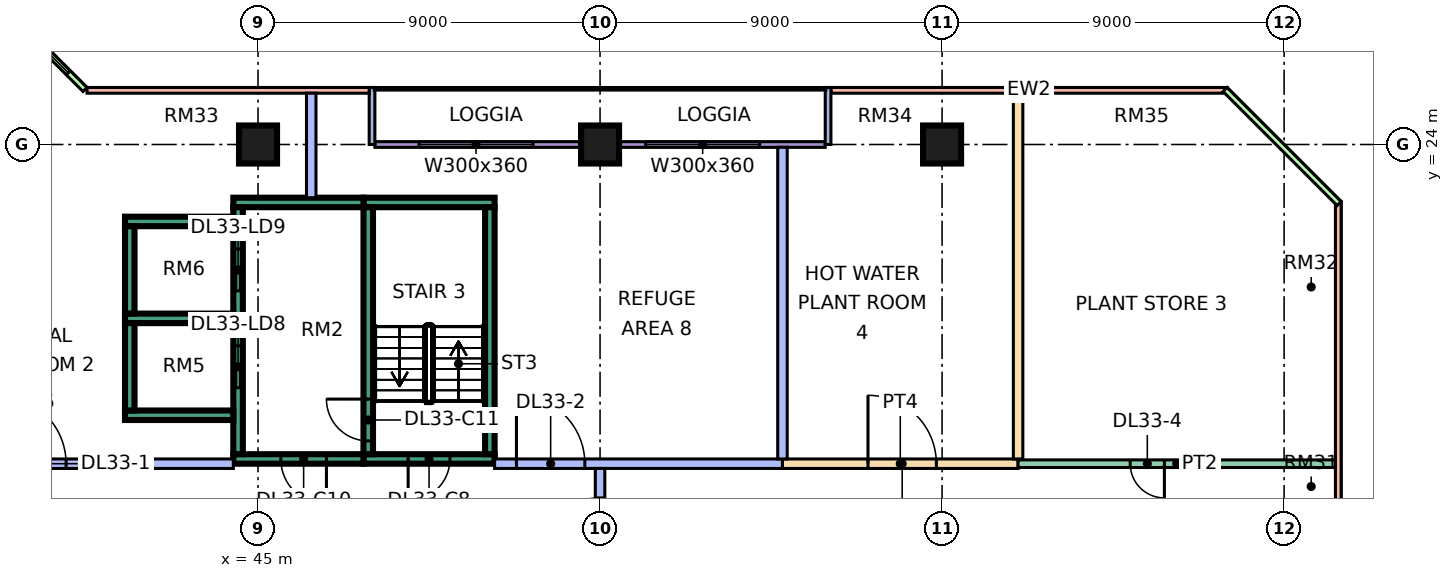
"""IFC4 building model, lengths in metres.
Left out: names, types, materials, properties, quantities, classifications, styles, units other than length and angle.
Written with IfcOpenShell. Run it as: python <this file> out.ifc"""

import sys

from ifc_helpers import new_model, si_unit, direction, frame, frame_2d, origin, origin_2d, place, context, subcontext, project, spatial, rectangle, extrude, element, fill, save


model = new_model("IFC4")
c1 = context("Model", 3, precision=1e-05, world=origin(), true_north=direction((0.0, 1.0)))
c2 = subcontext(c1, "Body", "Model", "MODEL_VIEW")
j1 = project(units=[si_unit("LENGTHUNIT", "METRE"), si_unit("PLANEANGLEUNIT", "RADIAN")], contexts=[c1])
p1 = place(None, origin())
s1 = spatial("IfcSite", under=j1, at=p1, CompositionType="ELEMENT")
p2 = place(p1, origin())
s2 = spatial("IfcBuilding", under=s1, at=p2, CompositionType="ELEMENT")
p3 = place(p2, frame((0.0, 0.0, 140.65)))
s3 = spatial("IfcBuildingStorey", under=s2, at=p3, CompositionType="ELEMENT", Elevation=140.65)
for number, where, z_axis, x_axis in (
    (1, (45.0, 24.0, 0.0), (0.0, 0.0, 1.0), (1.0, 0.0, 0.0)),
    (2, (54.0, 24.0, 0.0), (0.0, 0.0, 1.0), (1.0, 0.0, 0.0)),
    (3, (63.0, 24.0, 0.0), (0.0, 0.0, 1.0), (1.0, 0.0, 0.0)),
):
    element("IfcColumn", number, at=place(p3, frame(where, z_axis=z_axis, x_axis=x_axis)), inside=s3, PredefinedType="COLUMN", context=c2, shape_type="SweptSolid", body=[
        extrude(rectangle(XDim=1.0, YDim=1.0, at=origin_2d()), origin(), (0.0, 0.0, 1.0), 5.5),
    ])
p4 = place(p3, frame((47.775, 15.725, 0.0), z_axis=(0.0, 0.0, 1.0), x_axis=(1.0, 0.0, 0.0)))
e4 = element("IfcWall", 4, at=p4, inside=s3, PredefinedType="SHEAR", context=c2, shape_type="SweptSolid", body=[
    extrude(rectangle(XDim=3.45, YDim=0.25, at=frame_2d((1.725, 0.0))), origin(), (0.0, 0.0, 1.0), 5.5),
])
p5 = place(p4, frame((1.175, 0.0, 0.0)))
e5 = element("IfcOpeningElement", 5, at=p5, cuts=e4, PredefinedType="OPENING", context=c2, shape_type="SweptSolid", body=[
    extrude(rectangle(XDim=1.1, YDim=2.2, at=frame_2d((0.55, 1.1))), frame((0.0, 0.135, 0.0), z_axis=(0.0, -1.0, 0.0), x_axis=(1.0, 0.0, 0.0)), (0.0, 0.0, 1.0), 0.27),
])
p6 = place(p3, frame((47.775, 22.475, 0.0), z_axis=(0.0, 0.0, 1.0), x_axis=(1.0, 0.0, 0.0)))
e6 = element("IfcWall", 6, at=p6, inside=s3, PredefinedType="SHEAR", context=c2, shape_type="SweptSolid", body=[
    extrude(rectangle(XDim=3.45, YDim=0.25, at=frame_2d((1.725, 0.0))), origin(), (0.0, 0.0, 1.0), 5.5),
])
p7 = place(p3, frame((47.9, 15.85, 0.0), z_axis=(0.0, 0.0, 1.0), x_axis=(0.0, 1.0, 0.0)))
e7 = element("IfcWall", 7, at=p7, inside=s3, PredefinedType="SHEAR", context=c2, shape_type="SweptSolid", body=[
    extrude(rectangle(XDim=6.5, YDim=0.25, at=frame_2d((3.25, 0.0))), origin(), (0.0, 0.0, 1.0), 5.5),
])
p8 = place(p7, frame((0.35, 0.0, 0.0)))
e8 = element("IfcOpeningElement", 8, at=p8, cuts=e7, PredefinedType="OPENING", context=c2, shape_type="SweptSolid", body=[
    extrude(rectangle(XDim=1.1, YDim=2.2, at=frame_2d((0.55, 1.1))), frame((0.0, 0.135, 0.0), z_axis=(0.0, -1.0, 0.0), x_axis=(1.0, 0.0, 0.0)), (0.0, 0.0, 1.0), 0.27),
])
p9 = place(p3, frame((51.1, 15.85, 0.0), z_axis=(0.0, 0.0, 1.0), x_axis=(0.0, 1.0, 0.0)))
e9 = element("IfcWall", 9, at=p9, inside=s3, PredefinedType="SHEAR", context=c2, shape_type="SweptSolid", body=[
    extrude(rectangle(XDim=6.5, YDim=0.25, at=frame_2d((3.25, 0.0))), origin(), (0.0, 0.0, 1.0), 5.5),
])
p10 = place(p3, frame((44.35, 15.725, 0.0), z_axis=(0.0, 0.0, 1.0), x_axis=(1.0, 0.0, 0.0)))
e10 = element("IfcWall", 10, at=p10, inside=s3, PredefinedType="SHEAR", context=c2, shape_type="SweptSolid", body=[
    extrude(rectangle(XDim=3.425, YDim=0.25, at=frame_2d((1.712, 0.0))), origin(), (0.0, 0.0, 1.0), 5.5),
])
p11 = place(p10, frame((1.25, 0.0, 0.0)))
e11 = element("IfcOpeningElement", 11, at=p11, cuts=e10, PredefinedType="OPENING", context=c2, shape_type="SweptSolid", body=[
    extrude(rectangle(XDim=1.2, YDim=2.2, at=frame_2d((0.6, 1.1))), frame((0.0, 0.135, 0.0), z_axis=(0.0, -1.0, 0.0), x_axis=(1.0, 0.0, 0.0)), (0.0, 0.0, 1.0), 0.27),
])
p12 = place(p3, frame((44.35, 22.475, 0.0), z_axis=(0.0, 0.0, 1.0), x_axis=(1.0, 0.0, 0.0)))
e12 = element("IfcWall", 12, at=p12, inside=s3, PredefinedType="SHEAR", context=c2, shape_type="SweptSolid", body=[
    extrude(rectangle(XDim=3.425, YDim=0.25, at=frame_2d((1.712, 0.0))), origin(), (0.0, 0.0, 1.0), 5.5),
])
p13 = place(p3, frame((44.475, 15.85, 0.0), z_axis=(0.0, 0.0, 1.0), x_axis=(0.0, 1.0, 0.0)))
e13 = element("IfcWall", 13, at=p13, inside=s3, PredefinedType="SHEAR", context=c2, shape_type="SweptSolid", body=[
    extrude(rectangle(XDim=6.5, YDim=0.25, at=frame_2d((3.25, 0.0))), origin(), (0.0, 0.0, 1.0), 5.5),
])
p14 = place(p13, frame((1.75, 0.0, 0.0)))
e14 = element("IfcOpeningElement", 14, at=p14, cuts=e13, PredefinedType="OPENING", context=c2, shape_type="SweptSolid", body=[
    extrude(rectangle(XDim=1.1, YDim=2.2, at=frame_2d((0.55, 1.1))), frame((0.0, 0.135, 0.0), z_axis=(0.0, -1.0, 0.0), x_axis=(1.0, 0.0, 0.0)), (0.0, 0.0, 1.0), 0.27),
])
p15 = place(p13, frame((4.3, 0.0, 0.0)))
e15 = element("IfcOpeningElement", 15, at=p15, cuts=e13, PredefinedType="OPENING", context=c2, shape_type="SweptSolid", body=[
    extrude(rectangle(XDim=1.1, YDim=2.2, at=frame_2d((0.55, 1.1))), frame((0.0, 0.135, 0.0), z_axis=(0.0, -1.0, 0.0), x_axis=(1.0, 0.0, 0.0)), (0.0, 0.0, 1.0), 0.27),
])
for number, where, z_axis, x_axis in (
    (16, (41.5, 16.875, 0.0), (0.0, 0.0, 1.0), (1.0, 0.0, 0.0)),
    (17, (41.5, 19.425, 0.0), (0.0, 0.0, 1.0), (1.0, 0.0, 0.0)),
    (18, (41.5, 21.975, 0.0), (0.0, 0.0, 1.0), (1.0, 0.0, 0.0)),
):
    element("IfcWall", number, at=place(p3, frame(where, z_axis=z_axis, x_axis=x_axis)), inside=s3, PredefinedType="SHEAR", context=c2, shape_type="SweptSolid", body=[
        extrude(rectangle(XDim=2.85, YDim=0.25, at=frame_2d((1.425, 0.0))), origin(), (0.0, 0.0, 1.0), 5.5),
    ])
for number, where, z_axis, x_axis in (
    (19, (41.625, 17.0, 0.0), (0.0, 0.0, 1.0), (0.0, 1.0, 0.0)),
    (20, (41.625, 19.55, 0.0), (0.0, 0.0, 1.0), (0.0, 1.0, 0.0)),
):
    element("IfcWall", number, at=place(p3, frame(where, z_axis=z_axis, x_axis=x_axis)), inside=s3, PredefinedType="SHEAR", context=c2, shape_type="SweptSolid", body=[
        extrude(rectangle(XDim=2.3, YDim=0.25, at=frame_2d((1.15, 0.0))), origin(), (0.0, 0.0, 1.0), 5.5),
    ])
p16 = place(p3, frame((70.5, 25.425, 0.0), z_axis=(0.0, 0.0, 1.0), x_axis=(-1.0, 0.0, 0.0)))
e21 = element("IfcWall", 21, at=p16, inside=s3, PredefinedType="SOLIDWALL", context=c2, shape_type="SweptSolid", body=[
    extrude(rectangle(XDim=10.425, YDim=0.15, at=frame_2d((5.212, 0.0))), origin(), (0.0, 0.0, 1.0), 5.05),
])
p17 = place(p3, frame((59.925, 24.0, 0.0), z_axis=(0.0, 0.0, 1.0), x_axis=(-1.0, 0.0, 0.0)))
e22 = element("IfcWall", 22, at=p17, inside=s3, PredefinedType="SOLIDWALL", context=c2, shape_type="SweptSolid", body=[
    extrude(rectangle(XDim=11.85, YDim=0.15, at=frame_2d((5.925, 0.0))), origin(), (0.0, 0.0, 1.0), 5.05),
])
p18 = place(p17, frame((1.725, 0.0, 0.45)))
e23 = element("IfcOpeningElement", 23, at=p18, cuts=e22, PredefinedType="OPENING", context=c2, shape_type="SweptSolid", body=[
    extrude(rectangle(XDim=3.0, YDim=3.6, at=frame_2d((1.5, 1.8))), frame((0.0, 0.085, 0.0), z_axis=(0.0, -1.0, 0.0), x_axis=(1.0, 0.0, 0.0)), (0.0, 0.0, 1.0), 0.17),
])
p19 = place(p17, frame((7.688, 0.0, 0.45)))
e24 = element("IfcOpeningElement", 24, at=p19, cuts=e22, PredefinedType="OPENING", context=c2, shape_type="SweptSolid", body=[
    extrude(rectangle(XDim=3.0, YDim=3.6, at=frame_2d((1.5, 1.8))), frame((0.0, 0.085, 0.0), z_axis=(0.0, -1.0, 0.0), x_axis=(1.0, 0.0, 0.0)), (0.0, 0.0, 1.0), 0.17),
])
for number, where, z_axis, x_axis in (
    (25, (60.0, 25.5, 0.0), (0.0, 0.0, 1.0), (0.0, -1.0, 0.0)),
    (26, (48.0, 25.5, 0.0), (0.0, 0.0, 1.0), (0.0, -1.0, 0.0)),
):
    element("IfcWall", number, at=place(p3, frame(where, z_axis=z_axis, x_axis=x_axis)), inside=s3, PredefinedType="SOLIDWALL", context=c2, shape_type="SweptSolid", body=[
        extrude(rectangle(XDim=1.5, YDim=0.15, at=frame_2d((0.75, 0.0))), origin(), (0.0, 0.0, 1.0), 5.05),
    ])
p20 = place(p3, frame((47.925, 25.425, 0.0), z_axis=(0.0, 0.0, 1.0), x_axis=(-1.0, 0.0, 0.0)))
e27 = element("IfcWall", 27, at=p20, inside=s3, PredefinedType="SOLIDWALL", context=c2, shape_type="SweptSolid", body=[
    extrude(rectangle(XDim=7.425, YDim=0.15, at=frame_2d((3.712, 0.0))), origin(), (0.0, 0.0, 1.0), 5.05),
])
p21 = place(p3, frame((40.447, 25.447, 0.0), z_axis=(0.0, 0.0, 1.0), x_axis=(-0.707106781187, 0.707106781187, 0.0)))
e28 = element("IfcWall", 28, at=p21, inside=s3, PredefinedType="SOLIDWALL", context=c2, shape_type="SweptSolid", body=[
    extrude(rectangle(XDim=4.243, YDim=0.15, at=frame_2d((2.121, 0.0))), origin(), (0.0, 0.0, 1.0), 5.05),
])
p22 = place(p21, frame((0.621, 0.0, 0.45)))
e29 = element("IfcOpeningElement", 29, at=p22, cuts=e28, PredefinedType="OPENING", context=c2, shape_type="SweptSolid", body=[
    extrude(rectangle(XDim=3.0, YDim=3.6, at=frame_2d((1.5, 1.8))), frame((0.0, 0.085, 0.0), z_axis=(0.0, -1.0, 0.0), x_axis=(1.0, 0.0, 0.0)), (0.0, 0.0, 1.0), 0.17),
])
p23 = place(p3, frame((73.425, 12.075, 0.0), z_axis=(0.0, 0.0, 1.0), x_axis=(0.0, 1.0, 0.0)))
e30 = element("IfcWall", 30, at=p23, inside=s3, PredefinedType="SOLIDWALL", context=c2, shape_type="SweptSolid", body=[
    extrude(rectangle(XDim=10.425, YDim=0.15, at=frame_2d((5.212, 0.0))), origin(), (0.0, 0.0, 1.0), 5.05),
])
p24 = place(p3, frame((73.447, 22.447, 0.0), z_axis=(0.0, 0.0, 1.0), x_axis=(-0.707106781187, 0.707106781187, 0.0)))
e31 = element("IfcWall", 31, at=p24, inside=s3, PredefinedType="SOLIDWALL", context=c2, shape_type="SweptSolid", body=[
    extrude(rectangle(XDim=4.243, YDim=0.15, at=frame_2d((2.121, 0.0))), origin(), (0.0, 0.0, 1.0), 5.05),
])
p25 = place(p3, frame((34.0, 15.6, 0.0), z_axis=(0.0, 0.0, 1.0), x_axis=(1.0, 0.0, 0.0)))
e32 = element("IfcWall", 32, at=p25, inside=s3, PredefinedType="PARTITIONING", context=c2, shape_type="SweptSolid", body=[
    extrude(rectangle(XDim=10.35, YDim=0.25, at=frame_2d((5.175, 0.0))), origin(), (0.0, 0.0, 1.0), 5.05),
])
p26 = place(p25, frame((4.15, 0.0, 0.0)))
e33 = element("IfcOpeningElement", 33, at=p26, cuts=e32, PredefinedType="OPENING", context=c2, shape_type="SweptSolid", body=[
    extrude(rectangle(XDim=1.8, YDim=2.1, at=frame_2d((0.9, 1.05))), frame((0.0, 0.135, 0.0), z_axis=(0.0, -1.0, 0.0), x_axis=(1.0, 0.0, 0.0)), (0.0, 0.0, 1.0), 0.27),
])
p27 = place(p3, frame((46.4, 22.6, 0.0), z_axis=(0.0, 0.0, 1.0), x_axis=(0.0, 1.0, 0.0)))
e34 = element("IfcWall", 34, at=p27, inside=s3, PredefinedType="PARTITIONING", context=c2, shape_type="SweptSolid", body=[
    extrude(rectangle(XDim=2.75, YDim=0.25, at=frame_2d((1.375, 0.0))), origin(), (0.0, 0.0, 1.0), 5.05),
])
p28 = place(p3, frame((51.225, 15.6, 0.0), z_axis=(0.0, 0.0, 1.0), x_axis=(1.0, 0.0, 0.0)))
e35 = element("IfcWall", 35, at=p28, inside=s3, PredefinedType="PARTITIONING", context=c2, shape_type="SweptSolid", body=[
    extrude(rectangle(XDim=7.575, YDim=0.25, at=frame_2d((3.788, 0.0))), origin(), (0.0, 0.0, 1.0), 5.05),
])
p29 = place(p28, frame((0.575, 0.0, 0.0)))
e36 = element("IfcOpeningElement", 36, at=p29, cuts=e35, PredefinedType="OPENING", context=c2, shape_type="SweptSolid", body=[
    extrude(rectangle(XDim=1.8, YDim=2.1, at=frame_2d((0.9, 1.05))), frame((0.0, 0.135, 0.0), z_axis=(0.0, -1.0, 0.0), x_axis=(1.0, 0.0, 0.0)), (0.0, 0.0, 1.0), 0.27),
])
p30 = place(p3, frame((54.0, 0.074, 0.0), z_axis=(0.0, 0.0, 1.0), x_axis=(0.0, 1.0, 0.0)))
e37 = element("IfcWall", 37, at=p30, inside=s3, PredefinedType="PARTITIONING", context=c2, shape_type="SweptSolid", body=[
    extrude(rectangle(XDim=15.401, YDim=0.25, at=frame_2d((7.701, 0.0))), origin(), (0.0, 0.0, 1.0), 5.05),
])
p31 = place(p30, frame((12.826, 0.0, 0.0)))
e38 = element("IfcOpeningElement", 38, at=p31, cuts=e37, PredefinedType="OPENING", context=c2, shape_type="SweptSolid", body=[
    extrude(rectangle(XDim=1.8, YDim=2.1, at=frame_2d((0.9, 1.05))), frame((0.0, 0.135, 0.0), z_axis=(0.0, -1.0, 0.0), x_axis=(1.0, 0.0, 0.0)), (0.0, 0.0, 1.0), 0.27),
])
p32 = place(p3, frame((58.8, 15.6, 0.0), z_axis=(0.0, 0.0, 1.0), x_axis=(1.0, 0.0, 0.0)))
e39 = element("IfcWall", 39, at=p32, inside=s3, PredefinedType="PARTITIONING", context=c2, shape_type="SweptSolid", body=[
    extrude(rectangle(XDim=6.2, YDim=0.25, at=frame_2d((3.1, 0.0))), origin(), (0.0, 0.0, 1.0), 5.05),
])
p33 = place(p32, frame((2.25, 0.0, 0.0)))
e40 = element("IfcOpeningElement", 40, at=p33, cuts=e39, PredefinedType="OPENING", context=c2, shape_type="SweptSolid", body=[
    extrude(rectangle(XDim=1.8, YDim=2.1, at=frame_2d((0.9, 1.05))), frame((0.0, 0.135, 0.0), z_axis=(0.0, -1.0, 0.0), x_axis=(1.0, 0.0, 0.0)), (0.0, 0.0, 1.0), 0.27),
])
p34 = place(p3, frame((58.8, 15.725, 0.0), z_axis=(0.0, 0.0, 1.0), x_axis=(0.0, 1.0, 0.0)))
e41 = element("IfcWall", 41, at=p34, inside=s3, PredefinedType="PARTITIONING", context=c2, shape_type="SweptSolid", body=[
    extrude(rectangle(XDim=8.201, YDim=0.25, at=frame_2d((4.101, 0.0))), origin(), (0.0, 0.0, 1.0), 5.05),
])
p35 = place(p3, frame((65.0, 15.6, 0.0), z_axis=(0.0, 0.0, 1.0), x_axis=(1.0, 0.0, 0.0)))
e42 = element("IfcWall", 42, at=p35, inside=s3, PredefinedType="PARTITIONING", context=c2, shape_type="SweptSolid", body=[
    extrude(rectangle(XDim=8.35, YDim=0.2, at=frame_2d((4.175, 0.0))), origin(), (0.0, 0.0, 1.0), 5.05),
])
p36 = place(p35, frame((2.95, 0.0, 0.0)))
e43 = element("IfcOpeningElement", 43, at=p36, cuts=e42, PredefinedType="OPENING", context=c2, shape_type="SweptSolid", body=[
    extrude(rectangle(XDim=0.9, YDim=2.1, at=frame_2d((0.45, 1.05))), frame((0.0, 0.11, 0.0), z_axis=(0.0, -1.0, 0.0), x_axis=(1.0, 0.0, 0.0)), (0.0, 0.0, 1.0), 0.22),
])
p37 = place(p3, frame((65.0, 15.725, 0.0), z_axis=(0.0, 0.0, 1.0), x_axis=(0.0, 1.0, 0.0)))
e44 = element("IfcWall", 44, at=p37, inside=s3, PredefinedType="PARTITIONING", context=c2, shape_type="SweptSolid", body=[
    extrude(rectangle(XDim=9.625, YDim=0.25, at=frame_2d((4.812, 0.0))), origin(), (0.0, 0.0, 1.0), 5.05),
])
p38 = place(p18, origin())
e45 = element("IfcWindow", 45, at=p38, inside=s3, PartitioningType="SINGLE_PANEL", PredefinedType="WINDOW", context=c2, shape_type="SweptSolid", body=[
    extrude(rectangle(XDim=3.0, YDim=3.6, at=frame_2d((1.5, 1.8))), frame((0.0, 0.03, 0.0), z_axis=(0.0, -1.0, 0.0), x_axis=(1.0, 0.0, 0.0)), (0.0, 0.0, 1.0), 0.06),
])
fill(e23, e45)
p39 = place(p19, origin())
e46 = element("IfcWindow", 46, at=p39, inside=s3, PartitioningType="SINGLE_PANEL", PredefinedType="WINDOW", context=c2, shape_type="SweptSolid", body=[
    extrude(rectangle(XDim=3.0, YDim=3.6, at=frame_2d((1.5, 1.8))), frame((0.0, 0.03, 0.0), z_axis=(0.0, -1.0, 0.0), x_axis=(1.0, 0.0, 0.0)), (0.0, 0.0, 1.0), 0.06),
])
fill(e24, e46)
p40 = place(p22, origin())
e47 = element("IfcWindow", 47, at=p40, inside=s3, PartitioningType="SINGLE_PANEL", PredefinedType="WINDOW", context=c2, shape_type="SweptSolid", body=[
    extrude(rectangle(XDim=3.0, YDim=3.6, at=frame_2d((1.5, 1.8))), frame((0.0, 0.03, 0.0), z_axis=(0.0, -1.0, 0.0), x_axis=(1.0, 0.0, 0.0)), (0.0, 0.0, 1.0), 0.06),
])
fill(e29, e47)
p41 = place(p5, frame((1.1, 0.0, 0.0), z_axis=(0.0, 0.0, 1.0), x_axis=(-1.0, 0.0, 0.0)))
e48 = element("IfcDoor", 48, at=p41, inside=s3, OperationType="SINGLE_SWING_LEFT", PredefinedType="DOOR", context=c2, shape_type="SweptSolid", body=[
    extrude(rectangle(XDim=1.1, YDim=2.2, at=frame_2d((0.55, 1.1))), frame((0.0, 0.025, 0.0), z_axis=(0.0, -1.0, 0.0), x_axis=(1.0, 0.0, 0.0)), (0.0, 0.0, 1.0), 0.05),
])
fill(e5, e48)
p42 = place(p11, origin())
e49 = element("IfcDoor", 49, at=p42, inside=s3, OperationType="SINGLE_SWING_RIGHT", PredefinedType="DOOR", context=c2, shape_type="SweptSolid", body=[
    extrude(rectangle(XDim=1.2, YDim=2.2, at=frame_2d((0.6, 1.1))), frame((0.0, 0.025, 0.0), z_axis=(0.0, -1.0, 0.0), x_axis=(1.0, 0.0, 0.0)), (0.0, 0.0, 1.0), 0.05),
])
fill(e11, e49)
p43 = place(p8, frame((1.1, 0.0, 0.0), z_axis=(0.0, 0.0, 1.0), x_axis=(-1.0, 0.0, 0.0)))
e50 = element("IfcDoor", 50, at=p43, inside=s3, OperationType="SINGLE_SWING_RIGHT", PredefinedType="DOOR", context=c2, shape_type="SweptSolid", body=[
    extrude(rectangle(XDim=1.1, YDim=2.2, at=frame_2d((0.55, 1.1))), frame((0.0, 0.025, 0.0), z_axis=(0.0, -1.0, 0.0), x_axis=(1.0, 0.0, 0.0)), (0.0, 0.0, 1.0), 0.05),
])
fill(e8, e50)
p44 = place(p14, origin())
e51 = element("IfcDoor", 51, at=p44, inside=s3, OperationType="DOUBLE_DOOR_SLIDING", PredefinedType="DOOR", context=c2, shape_type="SweptSolid", body=[
    extrude(rectangle(XDim=1.1, YDim=2.2, at=frame_2d((0.55, 1.1))), frame((0.0, 0.025, 0.0), z_axis=(0.0, -1.0, 0.0), x_axis=(1.0, 0.0, 0.0)), (0.0, 0.0, 1.0), 0.05),
])
fill(e14, e51)
p45 = place(p15, origin())
e52 = element("IfcDoor", 52, at=p45, inside=s3, OperationType="DOUBLE_DOOR_SLIDING", PredefinedType="DOOR", context=c2, shape_type="SweptSolid", body=[
    extrude(rectangle(XDim=1.1, YDim=2.2, at=frame_2d((0.55, 1.1))), frame((0.0, 0.025, 0.0), z_axis=(0.0, -1.0, 0.0), x_axis=(1.0, 0.0, 0.0)), (0.0, 0.0, 1.0), 0.05),
])
fill(e15, e52)
p46 = place(p26, origin())
e53 = element("IfcDoor", 53, at=p46, inside=s3, OperationType="DOUBLE_DOOR_SINGLE_SWING", PredefinedType="DOOR", context=c2, shape_type="SweptSolid", body=[
    extrude(rectangle(XDim=1.8, YDim=2.1, at=frame_2d((0.9, 1.05))), frame((0.0, 0.025, 0.0), z_axis=(0.0, -1.0, 0.0), x_axis=(1.0, 0.0, 0.0)), (0.0, 0.0, 1.0), 0.05),
])
fill(e33, e53)
p47 = place(p29, origin())
e54 = element("IfcDoor", 54, at=p47, inside=s3, OperationType="DOUBLE_DOOR_SINGLE_SWING", PredefinedType="DOOR", context=c2, shape_type="SweptSolid", body=[
    extrude(rectangle(XDim=1.8, YDim=2.1, at=frame_2d((0.9, 1.05))), frame((0.0, 0.025, 0.0), z_axis=(0.0, -1.0, 0.0), x_axis=(1.0, 0.0, 0.0)), (0.0, 0.0, 1.0), 0.05),
])
fill(e36, e54)
p48 = place(p33, origin())
e55 = element("IfcDoor", 55, at=p48, inside=s3, OperationType="DOUBLE_DOOR_SINGLE_SWING", PredefinedType="DOOR", context=c2, shape_type="SweptSolid", body=[
    extrude(rectangle(XDim=1.8, YDim=2.1, at=frame_2d((0.9, 1.05))), frame((0.0, 0.025, 0.0), z_axis=(0.0, -1.0, 0.0), x_axis=(1.0, 0.0, 0.0)), (0.0, 0.0, 1.0), 0.05),
])
fill(e40, e55)
p49 = place(p36, origin())
e56 = element("IfcDoor", 56, at=p49, inside=s3, OperationType="SINGLE_SWING_RIGHT", PredefinedType="DOOR", context=c2, shape_type="SweptSolid", body=[
    extrude(rectangle(XDim=0.9, YDim=2.1, at=frame_2d((0.45, 1.05))), frame((0.0, 0.025, 0.0), z_axis=(0.0, -1.0, 0.0), x_axis=(1.0, 0.0, 0.0)), (0.0, 0.0, 1.0), 0.05),
])
fill(e43, e56)
p50 = place(p31, origin())
e57 = element("IfcDoor", 57, at=p50, inside=s3, OperationType="DOUBLE_DOOR_SINGLE_SWING", PredefinedType="DOOR", context=c2, shape_type="SweptSolid", body=[
    extrude(rectangle(XDim=1.8, YDim=2.1, at=frame_2d((0.9, 1.05))), frame((0.0, 0.025, 0.0), z_axis=(0.0, -1.0, 0.0), x_axis=(1.0, 0.0, 0.0)), (0.0, 0.0, 1.0), 0.05),
])
fill(e38, e57)
save(model, sys.argv[1])
